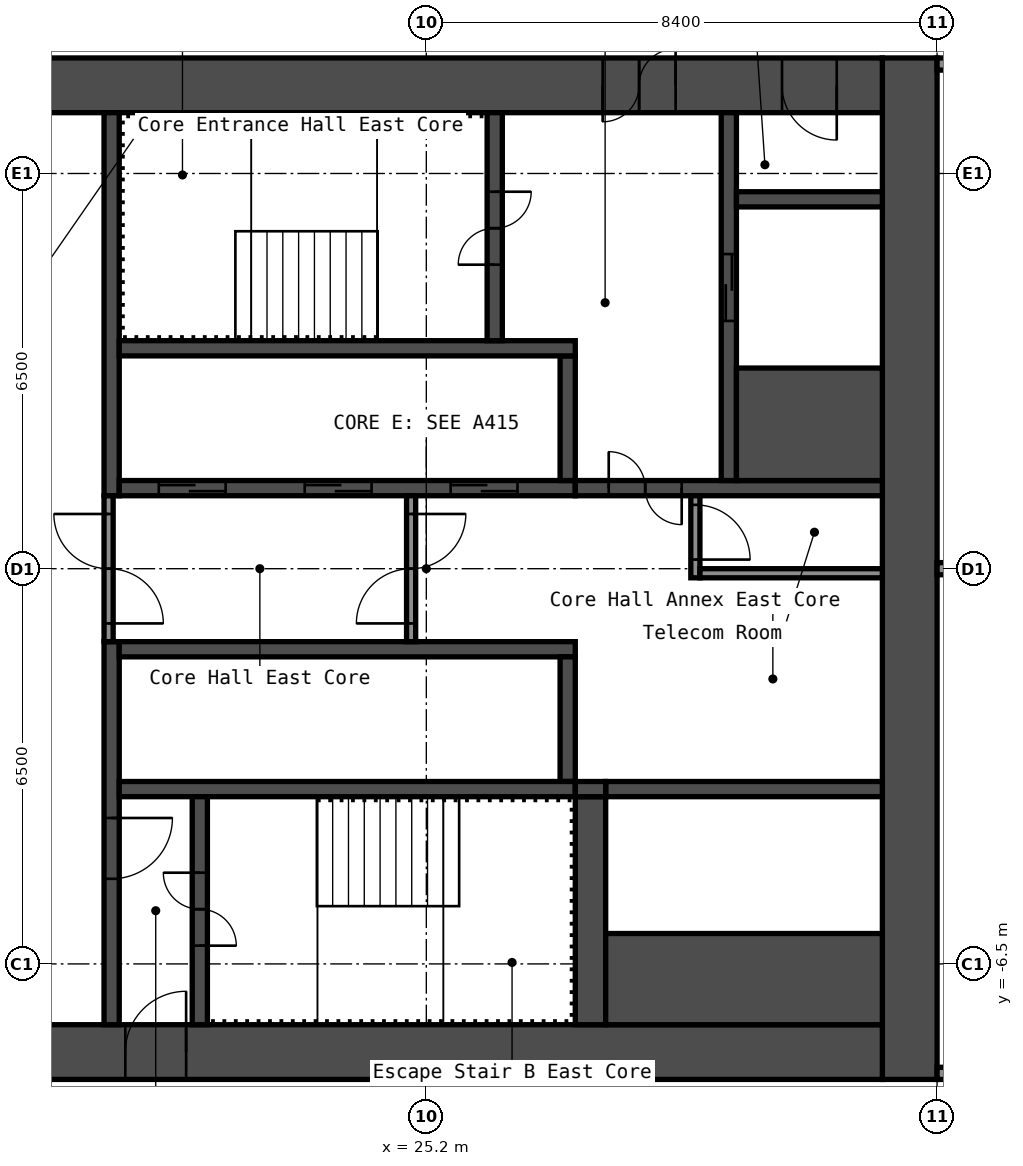
"""IFC4 building model, lengths in metres.
Left out: names, types, materials, properties, quantities, classifications, styles, units other than length and angle.
Written with IfcOpenShell. Run it as: python <this file> out.ifc"""

import sys

from ifc_helpers import new_model, si_unit, direction, frame, frame_2d, origin, place, context, subcontext, project, spatial, rectangle, extrude, element, fill, save


model = new_model("IFC4")
c1 = context("Model", 3, precision=1e-05, world=origin(), true_north=direction((0.0, 1.0)))
c2 = subcontext(c1, "Body", "Model", "MODEL_VIEW")
j1 = project(units=[si_unit("LENGTHUNIT", "METRE"), si_unit("PLANEANGLEUNIT", "RADIAN")], contexts=[c1])
p1 = place(None, origin())
s1 = spatial("IfcSite", under=j1, at=p1, CompositionType="ELEMENT")
p2 = place(p1, origin())
s2 = spatial("IfcBuilding", under=s1, at=p2, CompositionType="ELEMENT")
p3 = place(p2, frame((0.0, 0.0, 104.2)))
s3 = spatial("IfcBuildingStorey", under=s2, at=p3, CompositionType="ELEMENT", Elevation=104.2)
p4 = place(p3, frame((33.15, -8.4, 0.0), z_axis=(0.0, 0.0, 1.0), x_axis=(0.0, 1.0, 0.0)))
e1 = element("IfcWall", 1, at=p4, inside=s3, PredefinedType="SHEAR", context=c2, shape_type="SweptSolid", body=[
    extrude(rectangle(XDim=16.8, YDim=0.9, at=frame_2d((8.4, 0.0))), origin(), (0.0, 0.0, 1.0), 2.8),
])
p5 = place(p3, frame((17.7, 7.95, 0.0), z_axis=(0.0, 0.0, 1.0), x_axis=(1.0, 0.0, 0.0)))
e2 = element("IfcWall", 2, at=p5, inside=s3, PredefinedType="SHEAR", context=c2, shape_type="SweptSolid", body=[
    extrude(rectangle(XDim=15.0, YDim=0.9, at=frame_2d((7.5, 0.0))), origin(), (0.0, 0.0, 1.0), 2.8),
])
p6 = place(p5, frame((10.4, 0.0, 0.0)))
e3 = element("IfcOpeningElement", 3, at=p6, cuts=e2, PredefinedType="OPENING", context=c2, shape_type="SweptSolid", body=[
    extrude(rectangle(XDim=1.2, YDim=2.1, at=frame_2d((0.6, 1.05))), frame((0.0, 0.46, 0.0), z_axis=(0.0, -1.0, 0.0), x_axis=(1.0, 0.0, 0.0)), (0.0, 0.0, 1.0), 0.92),
])
p7 = place(p5, frame((13.35, 0.0, 0.0)))
e4 = element("IfcOpeningElement", 4, at=p7, cuts=e2, PredefinedType="OPENING", context=c2, shape_type="SweptSolid", body=[
    extrude(rectangle(XDim=0.9, YDim=2.1, at=frame_2d((0.45, 1.05))), frame((0.0, 0.46, 0.0), z_axis=(0.0, -1.0, 0.0), x_axis=(1.0, 0.0, 0.0)), (0.0, 0.0, 1.0), 0.92),
])
p8 = place(p3, frame((17.7, -7.95, 0.0), z_axis=(0.0, 0.0, 1.0), x_axis=(1.0, 0.0, 0.0)))
e5 = element("IfcWall", 5, at=p8, inside=s3, PredefinedType="SHEAR", context=c2, shape_type="SweptSolid", body=[
    extrude(rectangle(XDim=15.0, YDim=0.9, at=frame_2d((7.5, 0.0))), origin(), (0.0, 0.0, 1.0), 2.8),
])
p9 = place(p8, frame((2.55, 0.0, 0.0)))
e6 = element("IfcOpeningElement", 6, at=p9, cuts=e5, PredefinedType="OPENING", context=c2, shape_type="SweptSolid", body=[
    extrude(rectangle(XDim=1.0, YDim=2.1, at=frame_2d((0.5, 1.05))), frame((0.0, 0.46, 0.0), z_axis=(0.0, -1.0, 0.0), x_axis=(1.0, 0.0, 0.0)), (0.0, 0.0, 1.0), 0.92),
])
p10 = place(p3, frame((20.025, 1.2, 0.0), z_axis=(0.0, 0.0, 1.0), x_axis=(0.0, 1.0, 0.0)))
e7 = element("IfcWall", 7, at=p10, inside=s3, PredefinedType="SHEAR", context=c2, shape_type="SweptSolid", body=[
    extrude(rectangle(XDim=6.3, YDim=0.25, at=frame_2d((3.15, 0.0))), origin(), (0.0, 0.0, 1.0), 2.8),
])
p11 = place(p3, frame((20.025, -7.5, 0.0), z_axis=(0.0, 0.0, 1.0), x_axis=(0.0, 1.0, 0.0)))
e8 = element("IfcWall", 8, at=p11, inside=s3, PredefinedType="SHEAR", context=c2, shape_type="SweptSolid", body=[
    extrude(rectangle(XDim=6.3, YDim=0.25, at=frame_2d((3.15, 0.0))), origin(), (0.0, 0.0, 1.0), 2.8),
])
p12 = place(p11, frame((2.4, 0.0, 0.0)))
e9 = element("IfcOpeningElement", 9, at=p12, cuts=e8, PredefinedType="OPENING", context=c2, shape_type="SweptSolid", body=[
    extrude(rectangle(XDim=1.0, YDim=2.1, at=frame_2d((0.5, 1.05))), frame((0.0, 0.135, 0.0), z_axis=(0.0, -1.0, 0.0), x_axis=(1.0, 0.0, 0.0)), (0.0, 0.0, 1.0), 0.27),
])
p13 = place(p3, frame((20.15, 1.325, 0.0), z_axis=(0.0, 0.0, 1.0), x_axis=(1.0, 0.0, 0.0)))
e10 = element("IfcWall", 10, at=p13, inside=s3, PredefinedType="SHEAR", context=c2, shape_type="SweptSolid", body=[
    extrude(rectangle(XDim=7.5, YDim=0.25, at=frame_2d((3.75, 0.0))), origin(), (0.0, 0.0, 1.0), 2.8),
])
p14 = place(p13, frame((0.65, 0.0, 0.0)))
e11 = element("IfcOpeningElement", 11, at=p14, cuts=e10, PredefinedType="OPENING", context=c2, shape_type="SweptSolid", body=[
    extrude(rectangle(XDim=1.1, YDim=2.1, at=frame_2d((0.55, 1.05))), frame((0.0, 0.135, 0.0), z_axis=(0.0, -1.0, 0.0), x_axis=(1.0, 0.0, 0.0)), (0.0, 0.0, 1.0), 0.27),
])
p15 = place(p13, frame((3.05, 0.0, 0.0)))
e12 = element("IfcOpeningElement", 12, at=p15, cuts=e10, PredefinedType="OPENING", context=c2, shape_type="SweptSolid", body=[
    extrude(rectangle(XDim=1.1, YDim=2.1, at=frame_2d((0.55, 1.05))), frame((0.0, 0.135, 0.0), z_axis=(0.0, -1.0, 0.0), x_axis=(1.0, 0.0, 0.0)), (0.0, 0.0, 1.0), 0.27),
])
p16 = place(p13, frame((5.45, 0.0, 0.0)))
e13 = element("IfcOpeningElement", 13, at=p16, cuts=e10, PredefinedType="OPENING", context=c2, shape_type="SweptSolid", body=[
    extrude(rectangle(XDim=1.1, YDim=2.1, at=frame_2d((0.55, 1.05))), frame((0.0, 0.135, 0.0), z_axis=(0.0, -1.0, 0.0), x_axis=(1.0, 0.0, 0.0)), (0.0, 0.0, 1.0), 0.27),
])
p17 = place(p3, frame((27.525, 1.45, 0.0), z_axis=(0.0, 0.0, 1.0), x_axis=(0.0, 1.0, 0.0)))
e14 = element("IfcWall", 14, at=p17, inside=s3, PredefinedType="SHEAR", context=c2, shape_type="SweptSolid", body=[
    extrude(rectangle(XDim=2.05, YDim=0.25, at=frame_2d((1.025, 0.0))), origin(), (0.0, 0.0, 1.0), 2.8),
])
p18 = place(p3, frame((20.15, 3.625, 0.0), z_axis=(0.0, 0.0, 1.0), x_axis=(1.0, 0.0, 0.0)))
e15 = element("IfcWall", 15, at=p18, inside=s3, PredefinedType="SHEAR", context=c2, shape_type="SweptSolid", body=[
    extrude(rectangle(XDim=7.5, YDim=0.25, at=frame_2d((3.75, 0.0))), origin(), (0.0, 0.0, 1.0), 2.8),
])
p19 = place(p3, frame((26.325, 3.75, 0.0), z_axis=(0.0, 0.0, 1.0), x_axis=(0.0, 1.0, 0.0)))
e16 = element("IfcWall", 16, at=p19, inside=s3, PredefinedType="SHEAR", context=c2, shape_type="SweptSolid", body=[
    extrude(rectangle(XDim=3.75, YDim=0.25, at=frame_2d((1.875, 0.0))), origin(), (0.0, 0.0, 1.0), 2.8),
])
p20 = place(p19, frame((1.25, 0.0, 0.0)))
e17 = element("IfcOpeningElement", 17, at=p20, cuts=e16, PredefinedType="OPENING", context=c2, shape_type="SweptSolid", body=[
    extrude(rectangle(XDim=1.2, YDim=2.1, at=frame_2d((0.6, 1.05))), frame((0.0, 0.135, 0.0), z_axis=(0.0, -1.0, 0.0), x_axis=(1.0, 0.0, 0.0)), (0.0, 0.0, 1.0), 0.27),
])
p21 = place(p3, frame((27.65, 1.325, 0.0), z_axis=(0.0, 0.0, 1.0), x_axis=(1.0, 0.0, 0.0)))
e18 = element("IfcWall", 18, at=p21, inside=s3, PredefinedType="SHEAR", context=c2, shape_type="SweptSolid", body=[
    extrude(rectangle(XDim=5.05, YDim=0.25, at=frame_2d((2.525, 0.0))), origin(), (0.0, 0.0, 1.0), 2.8),
])
p22 = place(p21, frame((0.55, 0.0, 0.0)))
e19 = element("IfcOpeningElement", 19, at=p22, cuts=e18, PredefinedType="OPENING", context=c2, shape_type="SweptSolid", body=[
    extrude(rectangle(XDim=1.2, YDim=2.1, at=frame_2d((0.6, 1.05))), frame((0.0, 0.135, 0.0), z_axis=(0.0, -1.0, 0.0), x_axis=(1.0, 0.0, 0.0)), (0.0, 0.0, 1.0), 0.27),
])
p23 = place(p3, frame((30.175, 1.45, 0.0), z_axis=(0.0, 0.0, 1.0), x_axis=(0.0, 1.0, 0.0)))
e20 = element("IfcWall", 20, at=p23, inside=s3, PredefinedType="SHEAR", context=c2, shape_type="SweptSolid", body=[
    extrude(rectangle(XDim=6.05, YDim=0.25, at=frame_2d((3.025, 0.0))), origin(), (0.0, 0.0, 1.0), 2.8),
])
p24 = place(p23, frame((2.625, 0.0, 0.0)))
e21 = element("IfcOpeningElement", 21, at=p24, cuts=e20, PredefinedType="OPENING", context=c2, shape_type="SweptSolid", body=[
    extrude(rectangle(XDim=1.1, YDim=2.1, at=frame_2d((0.55, 1.05))), frame((0.0, 0.135, 0.0), z_axis=(0.0, -1.0, 0.0), x_axis=(1.0, 0.0, 0.0)), (0.0, 0.0, 1.0), 0.27),
])
p25 = place(p3, frame((30.3, 2.375, 0.0), z_axis=(0.0, 0.0, 1.0), x_axis=(1.0, 0.0, 0.0)))
e22 = element("IfcWall", 22, at=p25, inside=s3, PredefinedType="SHEAR", context=c2, shape_type="SweptSolid", body=[
    extrude(rectangle(XDim=2.4, YDim=1.85, at=frame_2d((1.2, 0.0))), origin(), (0.0, 0.0, 1.0), 2.8),
])
p26 = place(p3, frame((30.3, 6.075, 0.0), z_axis=(0.0, 0.0, 1.0), x_axis=(1.0, 0.0, 0.0)))
e23 = element("IfcWall", 23, at=p26, inside=s3, PredefinedType="SHEAR", context=c2, shape_type="SweptSolid", body=[
    extrude(rectangle(XDim=2.4, YDim=0.25, at=frame_2d((1.2, 0.0))), origin(), (0.0, 0.0, 1.0), 2.8),
])
p27 = place(p3, frame((20.15, -1.325, 0.0), z_axis=(0.0, 0.0, 1.0), x_axis=(1.0, 0.0, 0.0)))
e24 = element("IfcWall", 24, at=p27, inside=s3, PredefinedType="SHEAR", context=c2, shape_type="SweptSolid", body=[
    extrude(rectangle(XDim=7.5, YDim=0.25, at=frame_2d((3.75, 0.0))), origin(), (0.0, 0.0, 1.0), 2.8),
])
p28 = place(p3, frame((27.525, -3.5, 0.0), z_axis=(0.0, 0.0, 1.0), x_axis=(0.0, 1.0, 0.0)))
e25 = element("IfcWall", 25, at=p28, inside=s3, PredefinedType="SHEAR", context=c2, shape_type="SweptSolid", body=[
    extrude(rectangle(XDim=2.05, YDim=0.25, at=frame_2d((1.025, 0.0))), origin(), (0.0, 0.0, 1.0), 2.8),
])
p29 = place(p3, frame((20.15, -3.625, 0.0), z_axis=(0.0, 0.0, 1.0), x_axis=(1.0, 0.0, 0.0)))
e26 = element("IfcWall", 26, at=p29, inside=s3, PredefinedType="SHEAR", context=c2, shape_type="SweptSolid", body=[
    extrude(rectangle(XDim=7.5, YDim=0.25, at=frame_2d((3.75, 0.0))), origin(), (0.0, 0.0, 1.0), 2.8),
])
p30 = place(p3, frame((21.475, -7.5, 0.0), z_axis=(0.0, 0.0, 1.0), x_axis=(0.0, 1.0, 0.0)))
e27 = element("IfcWall", 27, at=p30, inside=s3, PredefinedType="SHEAR", context=c2, shape_type="SweptSolid", body=[
    extrude(rectangle(XDim=3.75, YDim=0.25, at=frame_2d((1.875, 0.0))), origin(), (0.0, 0.0, 1.0), 2.8),
])
p31 = place(p30, frame((1.3, 0.0, 0.0)))
e28 = element("IfcOpeningElement", 28, at=p31, cuts=e27, PredefinedType="OPENING", context=c2, shape_type="SweptSolid", body=[
    extrude(rectangle(XDim=1.2, YDim=2.1, at=frame_2d((0.6, 1.05))), frame((0.0, 0.135, 0.0), z_axis=(0.0, -1.0, 0.0), x_axis=(1.0, 0.0, 0.0)), (0.0, 0.0, 1.0), 0.27),
])
p32 = place(p3, frame((27.9, -7.5, 0.0), z_axis=(0.0, 0.0, 1.0), x_axis=(0.0, 1.0, 0.0)))
e29 = element("IfcWall", 29, at=p32, inside=s3, PredefinedType="SHEAR", context=c2, shape_type="SweptSolid", body=[
    extrude(rectangle(XDim=3.75, YDim=0.5, at=frame_2d((1.875, 0.0))), origin(), (0.0, 0.0, 1.0), 2.8),
])
p33 = place(p3, frame((28.15, -3.625, 0.0), z_axis=(0.0, 0.0, 1.0), x_axis=(1.0, 0.0, 0.0)))
e30 = element("IfcWall", 30, at=p33, inside=s3, PredefinedType="SHEAR", context=c2, shape_type="SweptSolid", body=[
    extrude(rectangle(XDim=4.55, YDim=0.25, at=frame_2d((2.275, 0.0))), origin(), (0.0, 0.0, 1.0), 2.8),
])
p34 = place(p3, frame((28.15, -6.75, 0.0), z_axis=(0.0, 0.0, 1.0), x_axis=(1.0, 0.0, 0.0)))
e31 = element("IfcWall", 31, at=p34, inside=s3, PredefinedType="SHEAR", context=c2, shape_type="SweptSolid", body=[
    extrude(rectangle(XDim=4.55, YDim=1.5, at=frame_2d((2.275, 0.0))), origin(), (0.0, 0.0, 1.0), 2.8),
])
p35 = place(p3, frame((27.65, -3.625, 0.0), z_axis=(0.0, 0.0, 1.0), x_axis=(1.0, 0.0, 0.0)))
e32 = element("IfcWall", 32, at=p35, inside=s3, PredefinedType="SHEAR", context=c2, shape_type="SweptSolid", body=[
    extrude(rectangle(XDim=0.5, YDim=0.25, at=frame_2d((0.25, 0.0))), origin(), (0.0, 0.0, 1.0), 2.8),
])
p36 = place(p3, frame((19.975, -1.2, 0.0), z_axis=(0.0, 0.0, 1.0), x_axis=(0.0, 1.0, 0.0)))
e33 = element("IfcWall", 33, at=p36, inside=s3, PredefinedType="PARTITIONING", context=c2, shape_type="SweptSolid", body=[
    extrude(rectangle(XDim=2.4, YDim=0.15, at=frame_2d((1.2, 0.0))), origin(), (0.0, 0.0, 1.0), 2.8),
])
p37 = place(p36, frame((0.3, 0.0, 0.0)))
e34 = element("IfcOpeningElement", 34, at=p37, cuts=e33, PredefinedType="OPENING", context=c2, shape_type="SweptSolid", body=[
    extrude(rectangle(XDim=1.8, YDim=2.1, at=frame_2d((0.9, 1.05))), frame((0.0, 0.085, 0.0), z_axis=(0.0, -1.0, 0.0), x_axis=(1.0, 0.0, 0.0)), (0.0, 0.0, 1.0), 0.17),
])
p38 = place(p3, frame((24.95, -1.2, 0.0), z_axis=(0.0, 0.0, 1.0), x_axis=(0.0, 1.0, 0.0)))
e35 = element("IfcWall", 35, at=p38, inside=s3, PredefinedType="PARTITIONING", context=c2, shape_type="SweptSolid", body=[
    extrude(rectangle(XDim=2.4, YDim=0.15, at=frame_2d((1.2, 0.0))), origin(), (0.0, 0.0, 1.0), 2.8),
])
p39 = place(p38, frame((0.3, 0.0, 0.0)))
e36 = element("IfcOpeningElement", 36, at=p39, cuts=e35, PredefinedType="OPENING", context=c2, shape_type="SweptSolid", body=[
    extrude(rectangle(XDim=1.8, YDim=2.1, at=frame_2d((0.9, 1.05))), frame((0.0, 0.085, 0.0), z_axis=(0.0, -1.0, 0.0), x_axis=(1.0, 0.0, 0.0)), (0.0, 0.0, 1.0), 0.17),
])
p40 = place(p3, frame((29.625, -0.15, 0.0), z_axis=(0.0, 0.0, 1.0), x_axis=(0.0, 1.0, 0.0)))
e37 = element("IfcWall", 37, at=p40, inside=s3, PredefinedType="PARTITIONING", context=c2, shape_type="SweptSolid", body=[
    extrude(rectangle(XDim=1.35, YDim=0.15, at=frame_2d((0.675, 0.0))), origin(), (0.0, 0.0, 1.0), 2.8),
])
p41 = place(p40, frame((0.3, 0.0, 0.0)))
e38 = element("IfcOpeningElement", 38, at=p41, cuts=e37, PredefinedType="OPENING", context=c2, shape_type="SweptSolid", body=[
    extrude(rectangle(XDim=0.9, YDim=2.1, at=frame_2d((0.45, 1.05))), frame((0.0, 0.085, 0.0), z_axis=(0.0, -1.0, 0.0), x_axis=(1.0, 0.0, 0.0)), (0.0, 0.0, 1.0), 0.17),
])
p42 = place(p3, frame((29.7, -0.075, 0.0), z_axis=(0.0, 0.0, 1.0), x_axis=(1.0, 0.0, 0.0)))
e39 = element("IfcWall", 39, at=p42, inside=s3, PredefinedType="PARTITIONING", context=c2, shape_type="SweptSolid", body=[
    extrude(rectangle(XDim=3.0, YDim=0.15, at=frame_2d((1.5, 0.0))), origin(), (0.0, 0.0, 1.0), 2.8),
])
p43 = place(p3, frame((33.6, -8.3, 0.0), z_axis=(0.0, 0.0, 1.0), x_axis=(1.0, 0.0, 0.0)))
e40 = element("IfcWall", 40, at=p43, inside=s3, PredefinedType="PARTITIONING", context=c2, shape_type="SweptSolid", body=[
    extrude(rectangle(XDim=10.4, YDim=0.2, at=frame_2d((5.2, 0.0))), origin(), (0.0, 0.0, 1.0), 2.8),
])
p44 = place(p43, frame((3.05, 0.0, 0.0)))
e41 = element("IfcOpeningElement", 41, at=p44, cuts=e40, PredefinedType="OPENING", context=c2, shape_type="SweptSolid", body=[
    extrude(rectangle(XDim=1.0, YDim=2.1, at=frame_2d((0.5, 1.05))), frame((0.0, 0.11, 0.0), z_axis=(0.0, -1.0, 0.0), x_axis=(1.0, 0.0, 0.0)), (0.0, 0.0, 1.0), 0.22),
])
p45 = place(p3, frame((33.6, 0.0, 0.0), z_axis=(0.0, 0.0, 1.0), x_axis=(1.0, 0.0, 0.0)))
e42 = element("IfcWall", 42, at=p45, inside=s3, PredefinedType="PARTITIONING", context=c2, shape_type="SweptSolid", body=[
    extrude(rectangle(XDim=10.3, YDim=0.2, at=frame_2d((5.15, 0.0))), origin(), (0.0, 0.0, 1.0), 2.8),
])
p46 = place(p3, frame((33.6, 8.3, 0.0), z_axis=(0.0, 0.0, 1.0), x_axis=(1.0, 0.0, 0.0)))
e43 = element("IfcWall", 43, at=p46, inside=s3, PredefinedType="PARTITIONING", context=c2, shape_type="SweptSolid", body=[
    extrude(rectangle(XDim=10.4, YDim=0.2, at=frame_2d((5.2, 0.0))), origin(), (0.0, 0.0, 1.0), 2.8),
])
p47 = place(p46, frame((3.05, 0.0, 0.0)))
e44 = element("IfcOpeningElement", 44, at=p47, cuts=e43, PredefinedType="OPENING", context=c2, shape_type="SweptSolid", body=[
    extrude(rectangle(XDim=1.0, YDim=2.1, at=frame_2d((0.5, 1.05))), frame((0.0, 0.11, 0.0), z_axis=(0.0, -1.0, 0.0), x_axis=(1.0, 0.0, 0.0)), (0.0, 0.0, 1.0), 0.22),
])
p48 = place(p6, origin())
e45 = element("IfcDoor", 45, at=p48, inside=s3, OperationType="DOUBLE_DOOR_SINGLE_SWING", PredefinedType="DOOR", context=c2, shape_type="SweptSolid", body=[
    extrude(rectangle(XDim=1.2, YDim=2.1, at=frame_2d((0.6, 1.05))), frame((0.0, 0.025, 0.0), z_axis=(0.0, -1.0, 0.0), x_axis=(1.0, 0.0, 0.0)), (0.0, 0.0, 1.0), 0.05),
])
fill(e3, e45)
p49 = place(p7, origin())
e46 = element("IfcDoor", 46, at=p49, inside=s3, OperationType="SINGLE_SWING_RIGHT", PredefinedType="DOOR", context=c2, shape_type="SweptSolid", body=[
    extrude(rectangle(XDim=0.9, YDim=2.1, at=frame_2d((0.45, 1.05))), frame((0.0, 0.025, 0.0), z_axis=(0.0, -1.0, 0.0), x_axis=(1.0, 0.0, 0.0)), (0.0, 0.0, 1.0), 0.05),
])
fill(e4, e46)
p50 = place(p9, origin())
e47 = element("IfcDoor", 47, at=p50, inside=s3, OperationType="SINGLE_SWING_LEFT", PredefinedType="DOOR", context=c2, shape_type="SweptSolid", body=[
    extrude(rectangle(XDim=1.0, YDim=2.1, at=frame_2d((0.5, 1.05))), frame((0.0, 0.025, 0.0), z_axis=(0.0, -1.0, 0.0), x_axis=(1.0, 0.0, 0.0)), (0.0, 0.0, 1.0), 0.05),
])
fill(e6, e47)
p51 = place(p20, origin())
e48 = element("IfcDoor", 48, at=p51, inside=s3, OperationType="DOUBLE_DOOR_SINGLE_SWING", PredefinedType="DOOR", context=c2, shape_type="SweptSolid", body=[
    extrude(rectangle(XDim=1.2, YDim=2.1, at=frame_2d((0.6, 1.05))), frame((0.0, 0.025, 0.0), z_axis=(0.0, -1.0, 0.0), x_axis=(1.0, 0.0, 0.0)), (0.0, 0.0, 1.0), 0.05),
])
fill(e17, e48)
p52 = place(p31, origin())
e49 = element("IfcDoor", 49, at=p52, inside=s3, OperationType="DOUBLE_DOOR_SINGLE_SWING", PredefinedType="DOOR", context=c2, shape_type="SweptSolid", body=[
    extrude(rectangle(XDim=1.2, YDim=2.1, at=frame_2d((0.6, 1.05))), frame((0.0, 0.025, 0.0), z_axis=(0.0, -1.0, 0.0), x_axis=(1.0, 0.0, 0.0)), (0.0, 0.0, 1.0), 0.05),
])
fill(e28, e49)
p53 = place(p12, origin())
e50 = element("IfcDoor", 50, at=p53, inside=s3, OperationType="SINGLE_SWING_RIGHT", PredefinedType="DOOR", context=c2, shape_type="SweptSolid", body=[
    extrude(rectangle(XDim=1.0, YDim=2.1, at=frame_2d((0.5, 1.05))), frame((0.0, 0.025, 0.0), z_axis=(0.0, -1.0, 0.0), x_axis=(1.0, 0.0, 0.0)), (0.0, 0.0, 1.0), 0.05),
])
fill(e9, e50)
p54 = place(p22, origin())
e51 = element("IfcDoor", 51, at=p54, inside=s3, OperationType="DOUBLE_DOOR_SINGLE_SWING", PredefinedType="DOOR", context=c2, shape_type="SweptSolid", body=[
    extrude(rectangle(XDim=1.2, YDim=2.1, at=frame_2d((0.6, 1.05))), frame((0.0, 0.025, 0.0), z_axis=(0.0, -1.0, 0.0), x_axis=(1.0, 0.0, 0.0)), (0.0, 0.0, 1.0), 0.05),
])
fill(e19, e51)
p55 = place(p37, origin())
e52 = element("IfcDoor", 52, at=p55, inside=s3, OperationType="DOUBLE_DOOR_SINGLE_SWING", PredefinedType="DOOR", context=c2, shape_type="SweptSolid", body=[
    extrude(rectangle(XDim=1.8, YDim=2.1, at=frame_2d((0.9, 1.05))), frame((0.0, 0.025, 0.0), z_axis=(0.0, -1.0, 0.0), x_axis=(1.0, 0.0, 0.0)), (0.0, 0.0, 1.0), 0.05),
])
fill(e34, e52)
p56 = place(p39, origin())
e53 = element("IfcDoor", 53, at=p56, inside=s3, OperationType="DOUBLE_DOOR_SINGLE_SWING", PredefinedType="DOOR", context=c2, shape_type="SweptSolid", body=[
    extrude(rectangle(XDim=1.8, YDim=2.1, at=frame_2d((0.9, 1.05))), frame((0.0, 0.025, 0.0), z_axis=(0.0, -1.0, 0.0), x_axis=(1.0, 0.0, 0.0)), (0.0, 0.0, 1.0), 0.05),
])
fill(e36, e53)
p57 = place(p41, origin())
e54 = element("IfcDoor", 54, at=p57, inside=s3, OperationType="SINGLE_SWING_LEFT", PredefinedType="DOOR", context=c2, shape_type="SweptSolid", body=[
    extrude(rectangle(XDim=0.9, YDim=2.1, at=frame_2d((0.45, 1.05))), frame((0.0, 0.025, 0.0), z_axis=(0.0, -1.0, 0.0), x_axis=(1.0, 0.0, 0.0)), (0.0, 0.0, 1.0), 0.05),
])
fill(e38, e54)
p58 = place(p14, origin())
e55 = element("IfcDoor", 55, at=p58, inside=s3, OperationType="DOUBLE_DOOR_SLIDING", PredefinedType="DOOR", context=c2, shape_type="SweptSolid", body=[
    extrude(rectangle(XDim=1.1, YDim=2.1, at=frame_2d((0.55, 1.05))), frame((0.0, 0.025, 0.0), z_axis=(0.0, -1.0, 0.0), x_axis=(1.0, 0.0, 0.0)), (0.0, 0.0, 1.0), 0.05),
])
fill(e11, e55)
p59 = place(p15, origin())
e56 = element("IfcDoor", 56, at=p59, inside=s3, OperationType="DOUBLE_DOOR_SLIDING", PredefinedType="DOOR", context=c2, shape_type="SweptSolid", body=[
    extrude(rectangle(XDim=1.1, YDim=2.1, at=frame_2d((0.55, 1.05))), frame((0.0, 0.025, 0.0), z_axis=(0.0, -1.0, 0.0), x_axis=(1.0, 0.0, 0.0)), (0.0, 0.0, 1.0), 0.05),
])
fill(e12, e56)
p60 = place(p16, origin())
e57 = element("IfcDoor", 57, at=p60, inside=s3, OperationType="DOUBLE_DOOR_SLIDING", PredefinedType="DOOR", context=c2, shape_type="SweptSolid", body=[
    extrude(rectangle(XDim=1.1, YDim=2.1, at=frame_2d((0.55, 1.05))), frame((0.0, 0.025, 0.0), z_axis=(0.0, -1.0, 0.0), x_axis=(1.0, 0.0, 0.0)), (0.0, 0.0, 1.0), 0.05),
])
fill(e13, e57)
p61 = place(p24, origin())
e58 = element("IfcDoor", 58, at=p61, inside=s3, OperationType="DOUBLE_DOOR_SLIDING", PredefinedType="DOOR", context=c2, shape_type="SweptSolid", body=[
    extrude(rectangle(XDim=1.1, YDim=2.1, at=frame_2d((0.55, 1.05))), frame((0.0, 0.025, 0.0), z_axis=(0.0, -1.0, 0.0), x_axis=(1.0, 0.0, 0.0)), (0.0, 0.0, 1.0), 0.05),
])
fill(e21, e58)
save(model, sys.argv[1])
